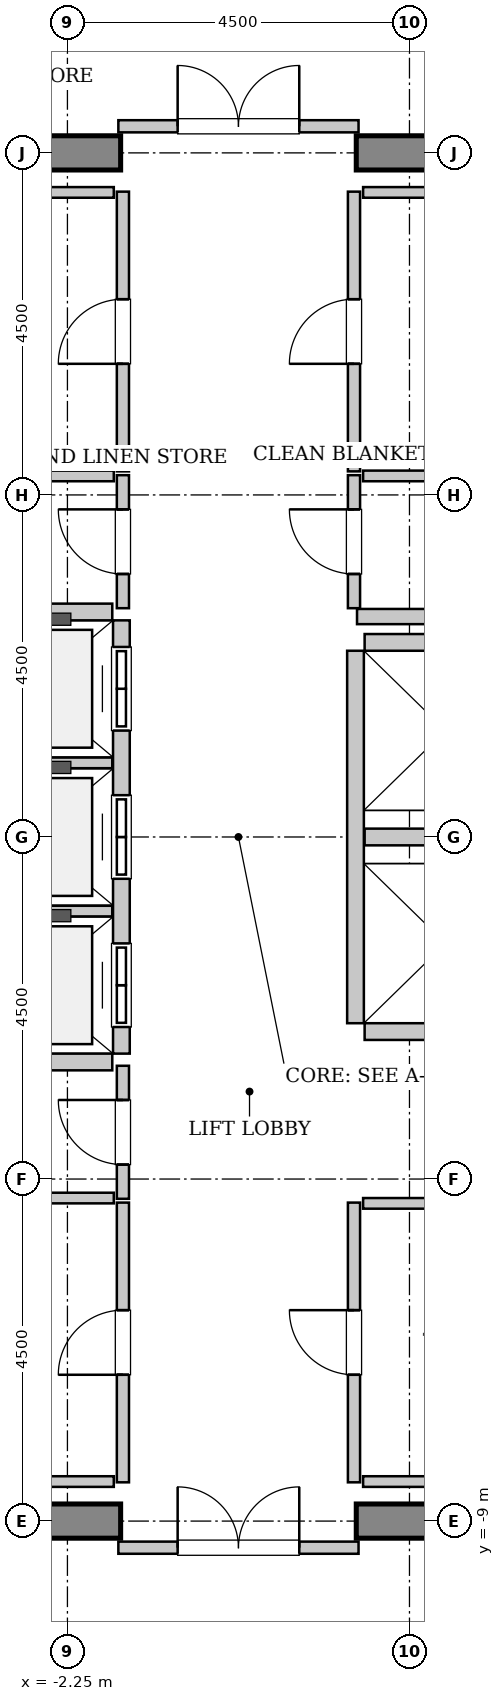
"""IFC4 building model, lengths in metres.
Left out: names, types, materials, properties, quantities, classifications, styles, units other than length and angle.
Written with IfcOpenShell. Run it as: python <this file> out.ifc"""

import sys

from ifc_helpers import new_model, si_unit, direction, frame, frame_2d, origin, place, context, subcontext, project, spatial, rectangle, extrude, source, transform, mapped, element, fill, save


model = new_model("IFC4")
c1 = context("Model", 3, precision=1e-05, world=origin(), true_north=direction((0.0, 1.0)))
c2 = subcontext(c1, "Body", "Model", "MODEL_VIEW")
j1 = project(units=[si_unit("LENGTHUNIT", "METRE"), si_unit("PLANEANGLEUNIT", "RADIAN")], contexts=[c1])
p1 = place(None, origin())
s1 = spatial("IfcSite", under=j1, at=p1, CompositionType="ELEMENT")
p2 = place(p1, origin())
s2 = spatial("IfcBuilding", under=s1, at=p2, CompositionType="ELEMENT")
p3 = place(p2, frame((0.0, 0.0, 310.2)))
s3 = spatial("IfcBuildingStorey", under=s2, at=p3, CompositionType="ELEMENT", Elevation=310.2)
m1 = source(origin(), c2, "Body", "SweptSolid", [
    extrude(rectangle(XDim=9.925, YDim=0.45, at=frame_2d((4.962, 0.0))), origin(), (0.0, 0.0, 1.0), 3.8),
])
for number, where, z_axis, x_axis in (
    (1, (-11.475, 9.0, 0.0), (0.0, 0.0, 1.0), (1.0, 0.0, 0.0)),
    (2, (1.55, 9.0, 0.0), (0.0, 0.0, 1.0), (1.0, 0.0, 0.0)),
    (3, (-11.475, -9.0, 0.0), (0.0, 0.0, 1.0), (1.0, 0.0, 0.0)),
    (4, (1.55, -9.0, 0.0), (0.0, 0.0, 1.0), (1.0, 0.0, 0.0)),
):
    element("IfcWall", number, at=place(p3, frame(where, z_axis=z_axis, x_axis=x_axis)), inside=s3, PredefinedType="SHEAR", context=c2, shape_type="MappedRepresentation", body=[
        mapped(m1, transform((0.0, 0.0, 0.0), x_axis=(1.0, 0.0, 0.0), y_axis=(0.0, 1.0, 0.0), z_axis=(0.0, 0.0, 1.0), scale=1.0)),
    ])
m2 = source(origin(), c2, "Body", "SweptSolid", [
    extrude(rectangle(XDim=5.7, YDim=0.22, at=frame_2d((2.85, 0.0))), origin(), (0.0, 0.0, 1.0), 3.535),
])
p4 = place(p3, frame((-1.54, -2.85, 0.0), z_axis=(0.0, 0.0, 1.0), x_axis=(0.0, 1.0, 0.0)))
e5 = element("IfcWall", 5, at=p4, inside=s3, PredefinedType="SOLIDWALL", context=c2, shape_type="MappedRepresentation", body=[
    mapped(m2, transform((0.0, 0.0, 0.0), x_axis=(1.0, 0.0, 0.0), y_axis=(0.0, 1.0, 0.0), z_axis=(0.0, 0.0, 1.0), scale=1.0)),
])
p5 = place(p4, frame((0.35, 0.0, 0.0)))
e6 = element("IfcOpeningElement", 6, at=p5, cuts=e5, PredefinedType="OPENING", context=c2, shape_type="SweptSolid", body=[
    extrude(rectangle(XDim=1.1, YDim=2.2, at=frame_2d((0.55, 1.1))), frame((0.0, 0.12, 0.0), z_axis=(0.0, -1.0, 0.0), x_axis=(1.0, 0.0, 0.0)), (0.0, 0.0, 1.0), 0.24),
])
p6 = place(p4, frame((2.3, 0.0, 0.0)))
e7 = element("IfcOpeningElement", 7, at=p6, cuts=e5, PredefinedType="OPENING", context=c2, shape_type="SweptSolid", body=[
    extrude(rectangle(XDim=1.1, YDim=2.2, at=frame_2d((0.55, 1.1))), frame((0.0, 0.12, 0.0), z_axis=(0.0, -1.0, 0.0), x_axis=(1.0, 0.0, 0.0)), (0.0, 0.0, 1.0), 0.24),
])
p7 = place(p4, frame((4.25, 0.0, 0.0)))
e8 = element("IfcOpeningElement", 8, at=p7, cuts=e5, PredefinedType="OPENING", context=c2, shape_type="SweptSolid", body=[
    extrude(rectangle(XDim=1.1, YDim=2.2, at=frame_2d((0.55, 1.1))), frame((0.0, 0.12, 0.0), z_axis=(0.0, -1.0, 0.0), x_axis=(1.0, 0.0, 0.0)), (0.0, 0.0, 1.0), 0.24),
])
m3 = source(origin(), c2, "Body", "SweptSolid", [
    extrude(rectangle(XDim=2.13, YDim=0.22, at=frame_2d((1.065, 0.0))), origin(), (0.0, 0.0, 1.0), 3.535),
])
p8 = place(p3, frame((-3.79, -2.96, 0.0), z_axis=(0.0, 0.0, 1.0), x_axis=(1.0, 0.0, 0.0)))
e9 = element("IfcWall", 9, at=p8, inside=s3, PredefinedType="SOLIDWALL", context=c2, shape_type="MappedRepresentation", body=[
    mapped(m3, transform((0.0, 0.0, 0.0), x_axis=(1.0, 0.0, 0.0), y_axis=(0.0, 1.0, 0.0), z_axis=(0.0, 0.0, 1.0), scale=1.0)),
])
m4 = source(origin(), c2, "Body", "SweptSolid", [
    extrude(rectangle(XDim=2.13, YDim=0.14, at=frame_2d((1.065, 0.0))), origin(), (0.0, 0.0, 1.0), 3.535),
])
for number, where, z_axis, x_axis in (
    (10, (-3.79, -0.975, 0.0), (0.0, 0.0, 1.0), (1.0, 0.0, 0.0)),
    (11, (-3.79, 0.975, 0.0), (0.0, 0.0, 1.0), (1.0, 0.0, 0.0)),
):
    element("IfcWall", number, at=place(p3, frame(where, z_axis=z_axis, x_axis=x_axis)), inside=s3, PredefinedType="PARTITIONING", context=c2, shape_type="MappedRepresentation", body=[
        mapped(m4, transform((0.0, 0.0, 0.0), x_axis=(1.0, 0.0, 0.0), y_axis=(0.0, 1.0, 0.0), z_axis=(0.0, 0.0, 1.0), scale=1.0)),
    ])
p9 = place(p3, frame((-1.66, 2.96, 0.0), z_axis=(0.0, 0.0, 1.0), x_axis=(-1.0, 0.0, 0.0)))
e12 = element("IfcWall", 12, at=p9, inside=s3, PredefinedType="SOLIDWALL", context=c2, shape_type="MappedRepresentation", body=[
    mapped(m3, transform((0.0, 0.0, 0.0), x_axis=(1.0, 0.0, 0.0), y_axis=(0.0, 1.0, 0.0), z_axis=(0.0, 0.0, 1.0), scale=1.0)),
])
m5 = source(origin(), c2, "Body", "SweptSolid", [
    extrude(rectangle(XDim=4.9, YDim=0.22, at=frame_2d((2.45, 0.0))), origin(), (0.0, 0.0, 1.0), 3.535),
])
p10 = place(p3, frame((1.54, 2.45, 0.0), z_axis=(0.0, 0.0, 1.0), x_axis=(0.0, -1.0, 0.0)))
e13 = element("IfcWall", 13, at=p10, inside=s3, PredefinedType="SOLIDWALL", context=c2, shape_type="MappedRepresentation", body=[
    mapped(m5, transform((0.0, 0.0, 0.0), x_axis=(1.0, 0.0, 0.0), y_axis=(0.0, 1.0, 0.0), z_axis=(0.0, 0.0, 1.0), scale=1.0)),
])
for number, where, z_axis, x_axis in (
    (14, (1.66, -2.56, 0.0), (0.0, 0.0, 1.0), (1.0, 0.0, 0.0)),
    (15, (1.66, 0.0, 0.0), (0.0, 0.0, 1.0), (1.0, 0.0, 0.0)),
    (16, (3.79, 2.56, 0.0), (0.0, 0.0, 1.0), (-1.0, 0.0, 0.0)),
):
    element("IfcWall", number, at=place(p3, frame(where, z_axis=z_axis, x_axis=x_axis)), inside=s3, PredefinedType="SOLIDWALL", context=c2, shape_type="MappedRepresentation", body=[
        mapped(m3, transform((0.0, 0.0, 0.0), x_axis=(1.0, 0.0, 0.0), y_axis=(0.0, 1.0, 0.0), z_axis=(0.0, 0.0, 1.0), scale=1.0)),
    ])
m6 = source(origin(), c2, "Body", "SweptSolid", [
    extrude(rectangle(XDim=2.52, YDim=0.2, at=frame_2d((1.26, 0.0))), origin(), (0.0, 0.0, 1.0), 3.535),
])
p11 = place(p3, frame((1.56, 2.9, 0.0), z_axis=(0.0, 0.0, 1.0), x_axis=(1.0, 0.0, 0.0)))
e17 = element("IfcWall", 17, at=p11, inside=s3, PredefinedType="PARTITIONING", context=c2, shape_type="MappedRepresentation", body=[
    mapped(m6, transform((0.0, 0.0, 0.0), x_axis=(1.0, 0.0, 0.0), y_axis=(0.0, 1.0, 0.0), z_axis=(0.0, 0.0, 1.0), scale=1.0)),
])
m7 = source(origin(), c2, "Body", "SweptSolid", [
    extrude(rectangle(XDim=3.16, YDim=0.16, at=frame_2d((1.58, 0.0))), origin(), (0.0, 0.0, 1.0), 2.625),
])
p12 = place(p3, frame((-1.58, 9.35, 0.0), z_axis=(0.0, 0.0, 1.0), x_axis=(1.0, 0.0, 0.0)))
e18 = element("IfcWall", 18, at=p12, inside=s3, PredefinedType="PARTITIONING", context=c2, shape_type="MappedRepresentation", body=[
    mapped(m7, transform((0.0, 0.0, 0.0), x_axis=(1.0, 0.0, 0.0), y_axis=(0.0, 1.0, 0.0), z_axis=(0.0, 0.0, 1.0), scale=1.0)),
])
p13 = place(p12, frame((0.78, 0.0, 0.0)))
e19 = element("IfcOpeningElement", 19, at=p13, cuts=e18, PredefinedType="OPENING", context=c2, shape_type="SweptSolid", body=[
    extrude(rectangle(XDim=1.6, YDim=2.3, at=frame_2d((0.8, 1.15))), frame((0.0, 0.09, 0.0), z_axis=(0.0, -1.0, 0.0), x_axis=(1.0, 0.0, 0.0)), (0.0, 0.0, 1.0), 0.18),
])
p14 = place(p3, frame((-1.58, -9.35, 0.0), z_axis=(0.0, 0.0, 1.0), x_axis=(1.0, 0.0, 0.0)))
e20 = element("IfcWall", 20, at=p14, inside=s3, PredefinedType="PARTITIONING", context=c2, shape_type="MappedRepresentation", body=[
    mapped(m7, transform((0.0, 0.0, 0.0), x_axis=(1.0, 0.0, 0.0), y_axis=(0.0, 1.0, 0.0), z_axis=(0.0, 0.0, 1.0), scale=1.0)),
])
p15 = place(p14, frame((0.78, 0.0, 0.0)))
e21 = element("IfcOpeningElement", 21, at=p15, cuts=e20, PredefinedType="OPENING", context=c2, shape_type="SweptSolid", body=[
    extrude(rectangle(XDim=1.6, YDim=2.3, at=frame_2d((0.8, 1.15))), frame((0.0, 0.09, 0.0), z_axis=(0.0, -1.0, 0.0), x_axis=(1.0, 0.0, 0.0)), (0.0, 0.0, 1.0), 0.18),
])
m8 = source(origin(), c2, "Body", "SweptSolid", [
    extrude(rectangle(XDim=1.75, YDim=0.16, at=frame_2d((0.875, 0.0))), origin(), (0.0, 0.0, 1.0), 3.535),
])
p16 = place(p3, frame((-1.52, 3.01, 0.0), z_axis=(0.0, 0.0, 1.0), x_axis=(0.0, 1.0, 0.0)))
e22 = element("IfcWall", 22, at=p16, inside=s3, PredefinedType="PARTITIONING", context=c2, shape_type="MappedRepresentation", body=[
    mapped(m8, transform((0.0, 0.0, 0.0), x_axis=(1.0, 0.0, 0.0), y_axis=(0.0, 1.0, 0.0), z_axis=(0.0, 0.0, 1.0), scale=1.0)),
])
p17 = place(p16, frame((0.45, 0.0, 0.0)))
e23 = element("IfcOpeningElement", 23, at=p17, cuts=e22, PredefinedType="OPENING", context=c2, shape_type="SweptSolid", body=[
    extrude(rectangle(XDim=0.85, YDim=2.1, at=frame_2d((0.425, 1.05))), frame((0.0, 0.09, 0.0), z_axis=(0.0, -1.0, 0.0), x_axis=(1.0, 0.0, 0.0)), (0.0, 0.0, 1.0), 0.18),
])
m9 = source(origin(), c2, "Body", "SweptSolid", [
    extrude(rectangle(XDim=2.95, YDim=0.14, at=frame_2d((1.475, 0.0))), origin(), (0.0, 0.0, 1.0), 3.535),
])
p18 = place(p3, frame((-4.59, 4.75, 0.0), z_axis=(0.0, 0.0, 1.0), x_axis=(1.0, 0.0, 0.0)))
e24 = element("IfcWall", 24, at=p18, inside=s3, PredefinedType="PARTITIONING", context=c2, shape_type="MappedRepresentation", body=[
    mapped(m9, transform((0.0, 0.0, 0.0), x_axis=(1.0, 0.0, 0.0), y_axis=(0.0, 1.0, 0.0), z_axis=(0.0, 0.0, 1.0), scale=1.0)),
])
m10 = source(origin(), c2, "Body", "SweptSolid", [
    extrude(rectangle(XDim=3.68, YDim=0.16, at=frame_2d((1.84, 0.0))), origin(), (0.0, 0.0, 1.0), 3.535),
])
p19 = place(p3, frame((-1.52, 4.81, 0.0), z_axis=(0.0, 0.0, 1.0), x_axis=(0.0, 1.0, 0.0)))
e25 = element("IfcWall", 25, at=p19, inside=s3, PredefinedType="PARTITIONING", context=c2, shape_type="MappedRepresentation", body=[
    mapped(m10, transform((0.0, 0.0, 0.0), x_axis=(1.0, 0.0, 0.0), y_axis=(0.0, 1.0, 0.0), z_axis=(0.0, 0.0, 1.0), scale=1.0)),
])
p20 = place(p19, frame((1.415, 0.0, 0.0)))
e26 = element("IfcOpeningElement", 26, at=p20, cuts=e25, PredefinedType="OPENING", context=c2, shape_type="SweptSolid", body=[
    extrude(rectangle(XDim=0.85, YDim=2.1, at=frame_2d((0.425, 1.05))), frame((0.0, 0.09, 0.0), z_axis=(0.0, -1.0, 0.0), x_axis=(1.0, 0.0, 0.0)), (0.0, 0.0, 1.0), 0.18),
])
m11 = source(origin(), c2, "Body", "SweptSolid", [
    extrude(rectangle(XDim=3.15, YDim=0.14, at=frame_2d((1.575, 0.0))), origin(), (0.0, 0.0, 1.0), 3.535),
])
p21 = place(p3, frame((-4.79, 8.48, 0.0), z_axis=(0.0, 0.0, 1.0), x_axis=(1.0, 0.0, 0.0)))
e27 = element("IfcWall", 27, at=p21, inside=s3, PredefinedType="PARTITIONING", context=c2, shape_type="MappedRepresentation", body=[
    mapped(m11, transform((0.0, 0.0, 0.0), x_axis=(1.0, 0.0, 0.0), y_axis=(0.0, 1.0, 0.0), z_axis=(0.0, 0.0, 1.0), scale=1.0)),
])
p22 = place(p3, frame((1.52, 3.01, 0.0), z_axis=(0.0, 0.0, 1.0), x_axis=(0.0, 1.0, 0.0)))
e28 = element("IfcWall", 28, at=p22, inside=s3, PredefinedType="PARTITIONING", context=c2, shape_type="MappedRepresentation", body=[
    mapped(m8, transform((0.0, 0.0, 0.0), x_axis=(1.0, 0.0, 0.0), y_axis=(0.0, 1.0, 0.0), z_axis=(0.0, 0.0, 1.0), scale=1.0)),
])
p23 = place(p22, frame((0.45, 0.0, 0.0)))
e29 = element("IfcOpeningElement", 29, at=p23, cuts=e28, PredefinedType="OPENING", context=c2, shape_type="SweptSolid", body=[
    extrude(rectangle(XDim=0.85, YDim=2.1, at=frame_2d((0.425, 1.05))), frame((0.0, 0.09, 0.0), z_axis=(0.0, -1.0, 0.0), x_axis=(1.0, 0.0, 0.0)), (0.0, 0.0, 1.0), 0.18),
])
p24 = place(p3, frame((1.64, 4.75, 0.0), z_axis=(0.0, 0.0, 1.0), x_axis=(1.0, 0.0, 0.0)))
e30 = element("IfcWall", 30, at=p24, inside=s3, PredefinedType="PARTITIONING", context=c2, shape_type="MappedRepresentation", body=[
    mapped(m11, transform((0.0, 0.0, 0.0), x_axis=(1.0, 0.0, 0.0), y_axis=(0.0, 1.0, 0.0), z_axis=(0.0, 0.0, 1.0), scale=1.0)),
])
p25 = place(p3, frame((1.52, 4.81, 0.0), z_axis=(0.0, 0.0, 1.0), x_axis=(0.0, 1.0, 0.0)))
e31 = element("IfcWall", 31, at=p25, inside=s3, PredefinedType="PARTITIONING", context=c2, shape_type="MappedRepresentation", body=[
    mapped(m10, transform((0.0, 0.0, 0.0), x_axis=(1.0, 0.0, 0.0), y_axis=(0.0, 1.0, 0.0), z_axis=(0.0, 0.0, 1.0), scale=1.0)),
])
p26 = place(p25, frame((1.415, 0.0, 0.0)))
e32 = element("IfcOpeningElement", 32, at=p26, cuts=e31, PredefinedType="OPENING", context=c2, shape_type="SweptSolid", body=[
    extrude(rectangle(XDim=0.85, YDim=2.1, at=frame_2d((0.425, 1.05))), frame((0.0, 0.09, 0.0), z_axis=(0.0, -1.0, 0.0), x_axis=(1.0, 0.0, 0.0)), (0.0, 0.0, 1.0), 0.18),
])
p27 = place(p3, frame((1.64, 8.48, 0.0), z_axis=(0.0, 0.0, 1.0), x_axis=(1.0, 0.0, 0.0)))
e33 = element("IfcWall", 33, at=p27, inside=s3, PredefinedType="PARTITIONING", context=c2, shape_type="MappedRepresentation", body=[
    mapped(m11, transform((0.0, 0.0, 0.0), x_axis=(1.0, 0.0, 0.0), y_axis=(0.0, 1.0, 0.0), z_axis=(0.0, 0.0, 1.0), scale=1.0)),
])
p28 = place(p3, frame((-1.52, -4.76, 0.0), z_axis=(0.0, 0.0, 1.0), x_axis=(0.0, 1.0, 0.0)))
e34 = element("IfcWall", 34, at=p28, inside=s3, PredefinedType="PARTITIONING", context=c2, shape_type="MappedRepresentation", body=[
    mapped(m8, transform((0.0, 0.0, 0.0), x_axis=(1.0, 0.0, 0.0), y_axis=(0.0, 1.0, 0.0), z_axis=(0.0, 0.0, 1.0), scale=1.0)),
])
p29 = place(p28, frame((0.45, 0.0, 0.0)))
e35 = element("IfcOpeningElement", 35, at=p29, cuts=e34, PredefinedType="OPENING", context=c2, shape_type="SweptSolid", body=[
    extrude(rectangle(XDim=0.85, YDim=2.1, at=frame_2d((0.425, 1.05))), frame((0.0, 0.09, 0.0), z_axis=(0.0, -1.0, 0.0), x_axis=(1.0, 0.0, 0.0)), (0.0, 0.0, 1.0), 0.18),
])
p30 = place(p3, frame((-4.79, -4.75, 0.0), z_axis=(0.0, 0.0, 1.0), x_axis=(1.0, 0.0, 0.0)))
e36 = element("IfcWall", 36, at=p30, inside=s3, PredefinedType="PARTITIONING", context=c2, shape_type="MappedRepresentation", body=[
    mapped(m11, transform((0.0, 0.0, 0.0), x_axis=(1.0, 0.0, 0.0), y_axis=(0.0, 1.0, 0.0), z_axis=(0.0, 0.0, 1.0), scale=1.0)),
])
p31 = place(p3, frame((-1.52, -8.49, 0.0), z_axis=(0.0, 0.0, 1.0), x_axis=(0.0, 1.0, 0.0)))
e37 = element("IfcWall", 37, at=p31, inside=s3, PredefinedType="PARTITIONING", context=c2, shape_type="MappedRepresentation", body=[
    mapped(m10, transform((0.0, 0.0, 0.0), x_axis=(1.0, 0.0, 0.0), y_axis=(0.0, 1.0, 0.0), z_axis=(0.0, 0.0, 1.0), scale=1.0)),
])
p32 = place(p31, frame((1.415, 0.0, 0.0)))
e38 = element("IfcOpeningElement", 38, at=p32, cuts=e37, PredefinedType="OPENING", context=c2, shape_type="SweptSolid", body=[
    extrude(rectangle(XDim=0.85, YDim=2.1, at=frame_2d((0.425, 1.05))), frame((0.0, 0.09, 0.0), z_axis=(0.0, -1.0, 0.0), x_axis=(1.0, 0.0, 0.0)), (0.0, 0.0, 1.0), 0.18),
])
m12 = source(origin(), c2, "Body", "SweptSolid", [
    extrude(rectangle(XDim=3.03, YDim=0.14, at=frame_2d((1.515, 0.0))), origin(), (0.0, 0.0, 1.0), 3.535),
])
p33 = place(p3, frame((-4.67, -8.48, 0.0), z_axis=(0.0, 0.0, 1.0), x_axis=(1.0, 0.0, 0.0)))
e39 = element("IfcWall", 39, at=p33, inside=s3, PredefinedType="PARTITIONING", context=c2, shape_type="MappedRepresentation", body=[
    mapped(m12, transform((0.0, 0.0, 0.0), x_axis=(1.0, 0.0, 0.0), y_axis=(0.0, 1.0, 0.0), z_axis=(0.0, 0.0, 1.0), scale=1.0)),
])
p34 = place(p3, frame((1.52, -8.49, 0.0), z_axis=(0.0, 0.0, 1.0), x_axis=(0.0, 1.0, 0.0)))
e40 = element("IfcWall", 40, at=p34, inside=s3, PredefinedType="PARTITIONING", context=c2, shape_type="MappedRepresentation", body=[
    mapped(m10, transform((0.0, 0.0, 0.0), x_axis=(1.0, 0.0, 0.0), y_axis=(0.0, 1.0, 0.0), z_axis=(0.0, 0.0, 1.0), scale=1.0)),
])
p35 = place(p34, frame((1.415, 0.0, 0.0)))
e41 = element("IfcOpeningElement", 41, at=p35, cuts=e40, PredefinedType="OPENING", context=c2, shape_type="SweptSolid", body=[
    extrude(rectangle(XDim=0.85, YDim=2.1, at=frame_2d((0.425, 1.05))), frame((0.0, 0.09, 0.0), z_axis=(0.0, -1.0, 0.0), x_axis=(1.0, 0.0, 0.0)), (0.0, 0.0, 1.0), 0.18),
])
p36 = place(p3, frame((1.64, -4.82, 0.0), z_axis=(0.0, 0.0, 1.0), x_axis=(1.0, 0.0, 0.0)))
e42 = element("IfcWall", 42, at=p36, inside=s3, PredefinedType="PARTITIONING", context=c2, shape_type="MappedRepresentation", body=[
    mapped(m9, transform((0.0, 0.0, 0.0), x_axis=(1.0, 0.0, 0.0), y_axis=(0.0, 1.0, 0.0), z_axis=(0.0, 0.0, 1.0), scale=1.0)),
])
p37 = place(p3, frame((1.64, -8.48, 0.0), z_axis=(0.0, 0.0, 1.0), x_axis=(1.0, 0.0, 0.0)))
e43 = element("IfcWall", 43, at=p37, inside=s3, PredefinedType="PARTITIONING", context=c2, shape_type="MappedRepresentation", body=[
    mapped(m11, transform((0.0, 0.0, 0.0), x_axis=(1.0, 0.0, 0.0), y_axis=(0.0, 1.0, 0.0), z_axis=(0.0, 0.0, 1.0), scale=1.0)),
])
m13 = source(origin(), c2, "Body", "SweptSolid", [
    extrude(rectangle(XDim=1.1, YDim=2.2, at=frame_2d((0.55, 1.1))), frame((0.0, 0.025, 0.0), z_axis=(0.0, -1.0, 0.0), x_axis=(1.0, 0.0, 0.0)), (0.0, 0.0, 1.0), 0.05),
])
p38 = place(p5, origin())
e44 = element("IfcDoor", 44, at=p38, inside=s3, OperationType="DOUBLE_DOOR_SLIDING", PredefinedType="DOOR", context=c2, shape_type="MappedRepresentation", body=[
    mapped(m13, transform((0.0, 0.0, 0.0), x_axis=(1.0, 0.0, 0.0), y_axis=(0.0, 1.0, 0.0), z_axis=(0.0, 0.0, 1.0), scale=1.0)),
])
fill(e6, e44)
p39 = place(p6, origin())
e45 = element("IfcDoor", 45, at=p39, inside=s3, OperationType="DOUBLE_DOOR_SLIDING", PredefinedType="DOOR", context=c2, shape_type="MappedRepresentation", body=[
    mapped(m13, transform((0.0, 0.0, 0.0), x_axis=(1.0, 0.0, 0.0), y_axis=(0.0, 1.0, 0.0), z_axis=(0.0, 0.0, 1.0), scale=1.0)),
])
fill(e7, e45)
p40 = place(p7, origin())
e46 = element("IfcDoor", 46, at=p40, inside=s3, OperationType="DOUBLE_DOOR_SLIDING", PredefinedType="DOOR", context=c2, shape_type="MappedRepresentation", body=[
    mapped(m13, transform((0.0, 0.0, 0.0), x_axis=(1.0, 0.0, 0.0), y_axis=(0.0, 1.0, 0.0), z_axis=(0.0, 0.0, 1.0), scale=1.0)),
])
fill(e8, e46)
m14 = source(origin(), c2, "Body", "SweptSolid", [
    extrude(rectangle(XDim=1.6, YDim=2.3, at=frame_2d((0.8, 1.15))), frame((0.0, 0.025, 0.0), z_axis=(0.0, -1.0, 0.0), x_axis=(1.0, 0.0, 0.0)), (0.0, 0.0, 1.0), 0.05),
])
p41 = place(p13, origin())
e47 = element("IfcDoor", 47, at=p41, inside=s3, OperationType="DOUBLE_DOOR_SINGLE_SWING", PredefinedType="DOOR", context=c2, shape_type="MappedRepresentation", body=[
    mapped(m14, transform((0.0, 0.0, 0.0), x_axis=(1.0, 0.0, 0.0), y_axis=(0.0, 1.0, 0.0), z_axis=(0.0, 0.0, 1.0), scale=1.0)),
])
fill(e19, e47)
p42 = place(p15, origin())
e48 = element("IfcDoor", 48, at=p42, inside=s3, OperationType="DOUBLE_DOOR_SINGLE_SWING", PredefinedType="DOOR", context=c2, shape_type="MappedRepresentation", body=[
    mapped(m14, transform((0.0, 0.0, 0.0), x_axis=(1.0, 0.0, 0.0), y_axis=(0.0, 1.0, 0.0), z_axis=(0.0, 0.0, 1.0), scale=1.0)),
])
fill(e21, e48)
m15 = source(origin(), c2, "Body", "SweptSolid", [
    extrude(rectangle(XDim=0.85, YDim=2.1, at=frame_2d((0.425, 1.05))), frame((0.0, 0.025, 0.0), z_axis=(0.0, -1.0, 0.0), x_axis=(1.0, 0.0, 0.0)), (0.0, 0.0, 1.0), 0.05),
])
p43 = place(p17, origin())
e49 = element("IfcDoor", 49, at=p43, inside=s3, OperationType="SINGLE_SWING_RIGHT", PredefinedType="DOOR", context=c2, shape_type="MappedRepresentation", body=[
    mapped(m15, transform((0.0, 0.0, 0.0), x_axis=(1.0, 0.0, 0.0), y_axis=(0.0, 1.0, 0.0), z_axis=(0.0, 0.0, 1.0), scale=1.0)),
])
fill(e23, e49)
p44 = place(p20, origin())
e50 = element("IfcDoor", 50, at=p44, inside=s3, OperationType="SINGLE_SWING_LEFT", PredefinedType="DOOR", context=c2, shape_type="MappedRepresentation", body=[
    mapped(m15, transform((0.0, 0.0, 0.0), x_axis=(1.0, 0.0, 0.0), y_axis=(0.0, 1.0, 0.0), z_axis=(0.0, 0.0, 1.0), scale=1.0)),
])
fill(e26, e50)
p45 = place(p23, origin())
e51 = element("IfcDoor", 51, at=p45, inside=s3, OperationType="SINGLE_SWING_RIGHT", PredefinedType="DOOR", context=c2, shape_type="MappedRepresentation", body=[
    mapped(m15, transform((0.0, 0.0, 0.0), x_axis=(1.0, 0.0, 0.0), y_axis=(0.0, 1.0, 0.0), z_axis=(0.0, 0.0, 1.0), scale=1.0)),
])
fill(e29, e51)
p46 = place(p26, origin())
e52 = element("IfcDoor", 52, at=p46, inside=s3, OperationType="SINGLE_SWING_LEFT", PredefinedType="DOOR", context=c2, shape_type="MappedRepresentation", body=[
    mapped(m15, transform((0.0, 0.0, 0.0), x_axis=(1.0, 0.0, 0.0), y_axis=(0.0, 1.0, 0.0), z_axis=(0.0, 0.0, 1.0), scale=1.0)),
])
fill(e32, e52)
p47 = place(p29, origin())
e53 = element("IfcDoor", 53, at=p47, inside=s3, OperationType="SINGLE_SWING_RIGHT", PredefinedType="DOOR", context=c2, shape_type="MappedRepresentation", body=[
    mapped(m15, transform((0.0, 0.0, 0.0), x_axis=(1.0, 0.0, 0.0), y_axis=(0.0, 1.0, 0.0), z_axis=(0.0, 0.0, 1.0), scale=1.0)),
])
fill(e35, e53)
p48 = place(p32, origin())
e54 = element("IfcDoor", 54, at=p48, inside=s3, OperationType="SINGLE_SWING_LEFT", PredefinedType="DOOR", context=c2, shape_type="MappedRepresentation", body=[
    mapped(m15, transform((0.0, 0.0, 0.0), x_axis=(1.0, 0.0, 0.0), y_axis=(0.0, 1.0, 0.0), z_axis=(0.0, 0.0, 1.0), scale=1.0)),
])
fill(e38, e54)
p49 = place(p35, origin())
e55 = element("IfcDoor", 55, at=p49, inside=s3, OperationType="SINGLE_SWING_RIGHT", PredefinedType="DOOR", context=c2, shape_type="MappedRepresentation", body=[
    mapped(m15, transform((0.0, 0.0, 0.0), x_axis=(1.0, 0.0, 0.0), y_axis=(0.0, 1.0, 0.0), z_axis=(0.0, 0.0, 1.0), scale=1.0)),
])
fill(e41, e55)
save(model, sys.argv[1])
